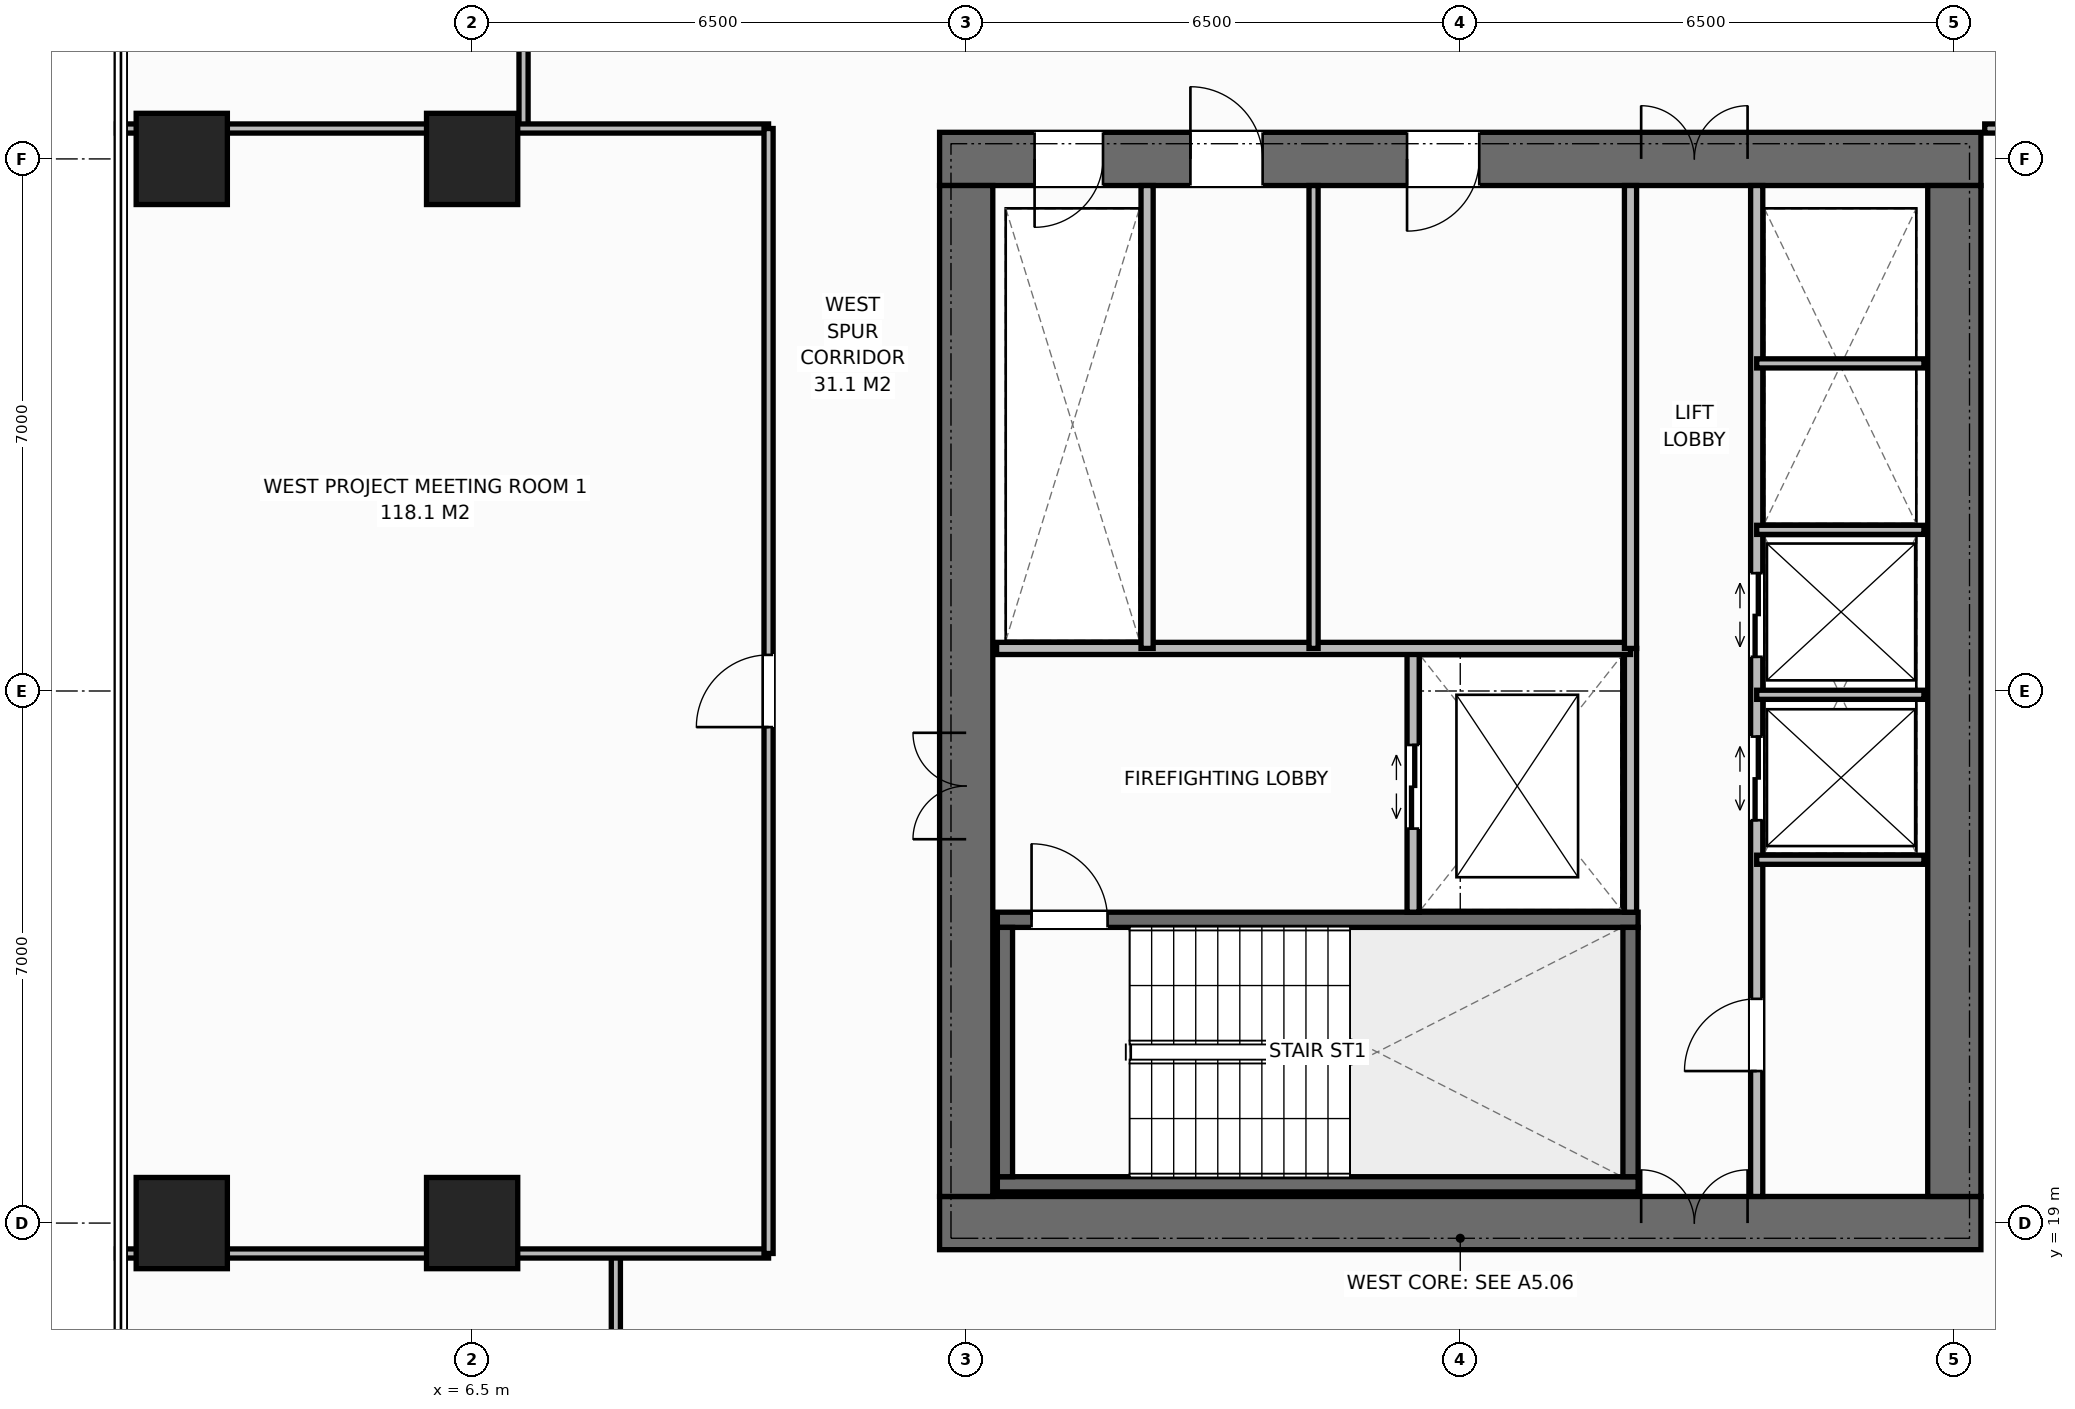
"""IFC4 building model, lengths in metres.
Left out: names, types, materials, properties, quantities, classifications, styles, units other than length and angle.
Written with IfcOpenShell. Run it as: python <this file> out.ifc"""

import sys

from ifc_helpers import new_model, si_unit, direction, frame, frame_2d, origin, origin_2d, place, context, subcontext, project, spatial, rectangle, extrude, element, fill, save


model = new_model("IFC4")
c1 = context("Model", 3, precision=1e-05, world=origin(), true_north=direction((0.0, 1.0)))
c2 = subcontext(c1, "Body", "Model", "MODEL_VIEW")
j1 = project(units=[si_unit("LENGTHUNIT", "METRE"), si_unit("PLANEANGLEUNIT", "RADIAN")], contexts=[c1])
p1 = place(None, origin())
s1 = spatial("IfcSite", under=j1, at=p1, CompositionType="ELEMENT")
p2 = place(p1, origin())
s2 = spatial("IfcBuilding", under=s1, at=p2, CompositionType="ELEMENT")
p3 = place(p2, frame((0.0, 0.0, 127.8)))
s3 = spatial("IfcBuildingStorey", under=s2, at=p3, CompositionType="ELEMENT", Elevation=127.8)
p4 = place(p3, frame((12.65, 19.0, 0.0), z_axis=(0.0, 0.0, 1.0), x_axis=(1.0, 0.0, 0.0)))
e1 = element("IfcWall", 1, at=p4, inside=s3, PredefinedType="SHEAR", context=c2, shape_type="SweptSolid", body=[
    extrude(rectangle(XDim=13.7, YDim=0.7, at=frame_2d((6.85, 0.0))), origin(), (0.0, 0.0, 1.0), 3.8),
])
p5 = place(p4, frame((9.23, 0.0, 0.0)))
e2 = element("IfcOpeningElement", 2, at=p5, cuts=e1, PredefinedType="OPENING", context=c2, shape_type="SweptSolid", body=[
    extrude(rectangle(XDim=1.4, YDim=2.2, at=frame_2d((0.7, 1.1))), frame((0.0, 0.36, 0.0), z_axis=(0.0, -1.0, 0.0), x_axis=(1.0, 0.0, 0.0)), (0.0, 0.0, 1.0), 0.72),
])
p6 = place(p3, frame((12.65, 33.0, 0.0), z_axis=(0.0, 0.0, 1.0), x_axis=(1.0, 0.0, 0.0)))
e3 = element("IfcWall", 3, at=p6, inside=s3, PredefinedType="SHEAR", context=c2, shape_type="SweptSolid", body=[
    extrude(rectangle(XDim=13.7, YDim=0.7, at=frame_2d((6.85, 0.0))), origin(), (0.0, 0.0, 1.0), 3.8),
])
p7 = place(p6, frame((1.25, 0.0, 0.0)))
e4 = element("IfcOpeningElement", 4, at=p7, cuts=e3, PredefinedType="OPENING", context=c2, shape_type="SweptSolid", body=[
    extrude(rectangle(XDim=0.9, YDim=2.15, at=frame_2d((0.45, 1.075))), frame((0.0, 0.36, 0.0), z_axis=(0.0, -1.0, 0.0), x_axis=(1.0, 0.0, 0.0)), (0.0, 0.0, 1.0), 0.72),
])
p8 = place(p6, frame((3.3, 0.0, 0.0)))
e5 = element("IfcOpeningElement", 5, at=p8, cuts=e3, PredefinedType="OPENING", context=c2, shape_type="SweptSolid", body=[
    extrude(rectangle(XDim=0.95, YDim=2.15, at=frame_2d((0.475, 1.075))), frame((0.0, 0.36, 0.0), z_axis=(0.0, -1.0, 0.0), x_axis=(1.0, 0.0, 0.0)), (0.0, 0.0, 1.0), 0.72),
])
p9 = place(p6, frame((6.15, 0.0, 0.0)))
e6 = element("IfcOpeningElement", 6, at=p9, cuts=e3, PredefinedType="OPENING", context=c2, shape_type="SweptSolid", body=[
    extrude(rectangle(XDim=0.95, YDim=2.15, at=frame_2d((0.475, 1.075))), frame((0.0, 0.36, 0.0), z_axis=(0.0, -1.0, 0.0), x_axis=(1.0, 0.0, 0.0)), (0.0, 0.0, 1.0), 0.72),
])
p10 = place(p6, frame((9.23, 0.0, 0.0)))
e7 = element("IfcOpeningElement", 7, at=p10, cuts=e3, PredefinedType="OPENING", context=c2, shape_type="SweptSolid", body=[
    extrude(rectangle(XDim=1.4, YDim=2.2, at=frame_2d((0.7, 1.1))), frame((0.0, 0.36, 0.0), z_axis=(0.0, -1.0, 0.0), x_axis=(1.0, 0.0, 0.0)), (0.0, 0.0, 1.0), 0.72),
])
p11 = place(p3, frame((13.0, 19.35, 0.0), z_axis=(0.0, 0.0, 1.0), x_axis=(0.0, 1.0, 0.0)))
e8 = element("IfcWall", 8, at=p11, inside=s3, PredefinedType="SHEAR", context=c2, shape_type="SweptSolid", body=[
    extrude(rectangle(XDim=13.3, YDim=0.7, at=frame_2d((6.65, 0.0))), origin(), (0.0, 0.0, 1.0), 3.8),
])
p12 = place(p11, frame((4.7, 0.0, 0.0)))
e9 = element("IfcOpeningElement", 9, at=p12, cuts=e8, PredefinedType="OPENING", context=c2, shape_type="SweptSolid", body=[
    extrude(rectangle(XDim=1.4, YDim=2.2, at=frame_2d((0.7, 1.1))), frame((0.0, 0.36, 0.0), z_axis=(0.0, -1.0, 0.0), x_axis=(1.0, 0.0, 0.0)), (0.0, 0.0, 1.0), 0.72),
])
p13 = place(p3, frame((26.0, 19.35, 0.0), z_axis=(0.0, 0.0, 1.0), x_axis=(0.0, 1.0, 0.0)))
e10 = element("IfcWall", 10, at=p13, inside=s3, PredefinedType="SHEAR", context=c2, shape_type="SweptSolid", body=[
    extrude(rectangle(XDim=13.3, YDim=0.7, at=frame_2d((6.65, 0.0))), origin(), (0.0, 0.0, 1.0), 3.8),
])
p14 = place(p3, frame((13.41, 19.51, 0.0), z_axis=(0.0, 0.0, 1.0), x_axis=(1.0, 0.0, 0.0)))
e11 = element("IfcWall", 11, at=p14, inside=s3, PredefinedType="SHEAR", context=c2, shape_type="SweptSolid", body=[
    extrude(rectangle(XDim=8.43, YDim=0.2, at=frame_2d((4.215, 0.0))), origin(), (0.0, 0.0, 1.0), 3.8),
])
p15 = place(p3, frame((13.41, 22.99, 0.0), z_axis=(0.0, 0.0, 1.0), x_axis=(1.0, 0.0, 0.0)))
e12 = element("IfcWall", 12, at=p15, inside=s3, PredefinedType="SHEAR", context=c2, shape_type="SweptSolid", body=[
    extrude(rectangle(XDim=8.43, YDim=0.2, at=frame_2d((4.215, 0.0))), origin(), (0.0, 0.0, 1.0), 3.8),
])
p16 = place(p15, frame((0.45, 0.0, 0.0)))
e13 = element("IfcOpeningElement", 13, at=p16, cuts=e12, PredefinedType="OPENING", context=c2, shape_type="SweptSolid", body=[
    extrude(rectangle(XDim=1.0, YDim=2.15, at=frame_2d((0.5, 1.075))), frame((0.0, 0.11, 0.0), z_axis=(0.0, -1.0, 0.0), x_axis=(1.0, 0.0, 0.0)), (0.0, 0.0, 1.0), 0.22),
])
for number, where, z_axis, x_axis in (
    (14, (13.51, 19.61, 0.0), (0.0, 0.0, 1.0), (0.0, 1.0, 0.0)),
    (15, (21.74, 19.61, 0.0), (0.0, 0.0, 1.0), (0.0, 1.0, 0.0)),
):
    element("IfcWall", number, at=place(p3, frame(where, z_axis=z_axis, x_axis=x_axis)), inside=s3, PredefinedType="SHEAR", context=c2, shape_type="SweptSolid", body=[
        extrude(rectangle(XDim=3.28, YDim=0.2, at=frame_2d((1.64, 0.0))), origin(), (0.0, 0.0, 1.0), 3.8),
    ])
for number, where, z_axis, x_axis in (
    (16, (6.5, 19.0, 0.0), (0.0, 0.0, 1.0), (1.0, 0.0, 0.0)),
    (17, (6.5, 33.0, 0.0), (0.0, 0.0, 1.0), (1.0, 0.0, 0.0)),
    (18, (2.68, 19.0, 0.0), (0.0, 0.0, 1.0), (1.0, 0.0, 0.0)),
    (19, (2.68, 33.0, 0.0), (0.0, 0.0, 1.0), (1.0, 0.0, 0.0)),
):
    element("IfcColumn", number, at=place(p3, frame(where, z_axis=z_axis, x_axis=x_axis)), inside=s3, PredefinedType="COLUMN", context=c2, shape_type="SweptSolid", body=[
        extrude(rectangle(XDim=1.2, YDim=1.2, at=origin_2d()), origin(), (0.0, 0.0, 1.0), 3.8),
    ])
p17 = place(p3, frame((21.74, 23.09, 0.0), z_axis=(0.0, 0.0, 1.0), x_axis=(0.0, 1.0, 0.0)))
e20 = element("IfcWall", 20, at=p17, inside=s3, PredefinedType="STANDARD", context=c2, shape_type="SweptSolid", body=[
    extrude(rectangle(XDim=3.47, YDim=0.16, at=frame_2d((1.735, 0.0))), origin(), (0.0, 0.0, 1.0), 3.565),
])
p18 = place(p3, frame((18.88, 23.09, 0.0), z_axis=(0.0, 0.0, 1.0), x_axis=(0.0, 1.0, 0.0)))
e21 = element("IfcWall", 21, at=p18, inside=s3, PredefinedType="STANDARD", context=c2, shape_type="SweptSolid", body=[
    extrude(rectangle(XDim=3.47, YDim=0.16, at=frame_2d((1.735, 0.0))), origin(), (0.0, 0.0, 1.0), 3.565),
])
p19 = place(p18, frame((1.1, 0.0, 0.0)))
e22 = element("IfcOpeningElement", 22, at=p19, cuts=e21, PredefinedType="OPENING", context=c2, shape_type="SweptSolid", body=[
    extrude(rectangle(XDim=1.1, YDim=2.2, at=frame_2d((0.55, 1.1))), frame((0.0, 0.09, 0.0), z_axis=(0.0, -1.0, 0.0), x_axis=(1.0, 0.0, 0.0)), (0.0, 0.0, 1.0), 0.18),
])
p20 = place(p3, frame((13.4, 26.56, 0.0), z_axis=(0.0, 0.0, 1.0), x_axis=(1.0, 0.0, 0.0)))
e23 = element("IfcWall", 23, at=p20, inside=s3, PredefinedType="STANDARD", context=c2, shape_type="SweptSolid", body=[
    extrude(rectangle(XDim=8.34, YDim=0.16, at=frame_2d((4.17, 0.0))), origin(), (0.0, 0.0, 1.0), 3.565),
])
p21 = place(p3, frame((15.38, 26.56, 0.0), z_axis=(0.0, 0.0, 1.0), x_axis=(0.0, 1.0, 0.0)))
e24 = element("IfcWall", 24, at=p21, inside=s3, PredefinedType="STANDARD", context=c2, shape_type="SweptSolid", body=[
    extrude(rectangle(XDim=6.09, YDim=0.16, at=frame_2d((3.045, 0.0))), origin(), (0.0, 0.0, 1.0), 3.565),
])
p22 = place(p3, frame((17.57, 26.56, 0.0), z_axis=(0.0, 0.0, 1.0), x_axis=(0.0, 1.0, 0.0)))
e25 = element("IfcWall", 25, at=p22, inside=s3, PredefinedType="PARTITIONING", context=c2, shape_type="SweptSolid", body=[
    extrude(rectangle(XDim=6.09, YDim=0.12, at=frame_2d((3.045, 0.0))), origin(), (0.0, 0.0, 1.0), 3.565),
])
p23 = place(p3, frame((21.74, 26.56, 0.0), z_axis=(0.0, 0.0, 1.0), x_axis=(0.0, 1.0, 0.0)))
e26 = element("IfcWall", 26, at=p23, inside=s3, PredefinedType="STANDARD", context=c2, shape_type="SweptSolid", body=[
    extrude(rectangle(XDim=6.09, YDim=0.16, at=frame_2d((3.045, 0.0))), origin(), (0.0, 0.0, 1.0), 3.565),
])
p24 = place(p3, frame((23.4, 19.35, 0.0), z_axis=(0.0, 0.0, 1.0), x_axis=(0.0, 1.0, 0.0)))
e27 = element("IfcWall", 27, at=p24, inside=s3, PredefinedType="STANDARD", context=c2, shape_type="SweptSolid", body=[
    extrude(rectangle(XDim=13.3, YDim=0.16, at=frame_2d((6.65, 0.0))), origin(), (0.0, 0.0, 1.0), 3.565),
])
p25 = place(p24, frame((1.65, 0.0, 0.0)))
e28 = element("IfcOpeningElement", 28, at=p25, cuts=e27, PredefinedType="OPENING", context=c2, shape_type="SweptSolid", body=[
    extrude(rectangle(XDim=0.95, YDim=2.15, at=frame_2d((0.475, 1.075))), frame((0.0, 0.09, 0.0), z_axis=(0.0, -1.0, 0.0), x_axis=(1.0, 0.0, 0.0)), (0.0, 0.0, 1.0), 0.18),
])
p26 = place(p24, frame((4.95, 0.0, 0.0)))
e29 = element("IfcOpeningElement", 29, at=p26, cuts=e27, PredefinedType="OPENING", context=c2, shape_type="SweptSolid", body=[
    extrude(rectangle(XDim=1.1, YDim=2.2, at=frame_2d((0.55, 1.1))), frame((0.0, 0.09, 0.0), z_axis=(0.0, -1.0, 0.0), x_axis=(1.0, 0.0, 0.0)), (0.0, 0.0, 1.0), 0.18),
])
p27 = place(p24, frame((7.1, 0.0, 0.0)))
e30 = element("IfcOpeningElement", 30, at=p27, cuts=e27, PredefinedType="OPENING", context=c2, shape_type="SweptSolid", body=[
    extrude(rectangle(XDim=1.1, YDim=2.2, at=frame_2d((0.55, 1.1))), frame((0.0, 0.09, 0.0), z_axis=(0.0, -1.0, 0.0), x_axis=(1.0, 0.0, 0.0)), (0.0, 0.0, 1.0), 0.18),
])
for number, where, z_axis, x_axis in (
    (31, (23.4, 23.78, 0.0), (0.0, 0.0, 1.0), (1.0, 0.0, 0.0)),
    (32, (23.4, 25.95, 0.0), (0.0, 0.0, 1.0), (1.0, 0.0, 0.0)),
    (33, (23.4, 28.12, 0.0), (0.0, 0.0, 1.0), (1.0, 0.0, 0.0)),
    (34, (23.4, 30.31, 0.0), (0.0, 0.0, 1.0), (1.0, 0.0, 0.0)),
):
    element("IfcWall", number, at=place(p3, frame(where, z_axis=z_axis, x_axis=x_axis)), inside=s3, PredefinedType="PARTITIONING", context=c2, shape_type="SweptSolid", body=[
        extrude(rectangle(XDim=2.2, YDim=0.12, at=frame_2d((1.1, 0.0))), origin(), (0.0, 0.0, 1.0), 3.565),
    ])
p28 = place(p3, frame((26.4, 33.4, 0.0), z_axis=(0.0, 0.0, 1.0), x_axis=(1.0, 0.0, 0.0)))
e35 = element("IfcWall", 35, at=p28, inside=s3, PredefinedType="PARTITIONING", context=c2, shape_type="SweptSolid", body=[
    extrude(rectangle(XDim=3.6, YDim=0.12, at=frame_2d((1.8, 0.0))), origin(), (0.0, 0.0, 1.0), 3.565),
])
p29 = place(p28, frame((1.1, 0.0, 0.0)))
e36 = element("IfcOpeningElement", 36, at=p29, cuts=e35, PredefinedType="OPENING", context=c2, shape_type="SweptSolid", body=[
    extrude(rectangle(XDim=0.95, YDim=2.15, at=frame_2d((0.475, 1.075))), frame((0.0, 0.07, 0.0), z_axis=(0.0, -1.0, 0.0), x_axis=(1.0, 0.0, 0.0)), (0.0, 0.0, 1.0), 0.14),
])
for number, where, z_axis, x_axis in (
    (37, (7.177, 33.4, 0.0), (0.0, 0.0, 1.0), (0.0, 1.0, 0.0)),
    (38, (8.391, 16.5, 0.0), (0.0, 0.0, 1.0), (0.0, 1.0, 0.0)),
):
    element("IfcWall", number, at=place(p3, frame(where, z_axis=z_axis, x_axis=x_axis)), inside=s3, PredefinedType="PARTITIONING", context=c2, shape_type="SweptSolid", body=[
        extrude(rectangle(XDim=2.1, YDim=0.12, at=frame_2d((1.05, 0.0))), origin(), (0.0, 0.0, 1.0), 3.565),
    ])
for number, where, z_axis, x_axis in (
    (39, (1.82, 18.6, 0.0), (0.0, 0.0, 1.0), (1.0, 0.0, 0.0)),
    (40, (1.82, 33.4, 0.0), (0.0, 0.0, 1.0), (1.0, 0.0, 0.0)),
):
    element("IfcWall", number, at=place(p3, frame(where, z_axis=z_axis, x_axis=x_axis)), inside=s3, PredefinedType="PARTITIONING", context=c2, shape_type="SweptSolid", body=[
        extrude(rectangle(XDim=8.58, YDim=0.12, at=frame_2d((4.29, 0.0))), origin(), (0.0, 0.0, 1.0), 3.565),
    ])
p30 = place(p3, frame((10.4, 18.6, 0.0), z_axis=(0.0, 0.0, 1.0), x_axis=(0.0, 1.0, 0.0)))
e41 = element("IfcWall", 41, at=p30, inside=s3, PredefinedType="PARTITIONING", context=c2, shape_type="SweptSolid", body=[
    extrude(rectangle(XDim=14.8, YDim=0.12, at=frame_2d((7.4, 0.0))), origin(), (0.0, 0.0, 1.0), 3.565),
])
p31 = place(p30, frame((6.925, 0.0, 0.0)))
e42 = element("IfcOpeningElement", 42, at=p31, cuts=e41, PredefinedType="OPENING", context=c2, shape_type="SweptSolid", body=[
    extrude(rectangle(XDim=0.95, YDim=2.15, at=frame_2d((0.475, 1.075))), frame((0.0, 0.07, 0.0), z_axis=(0.0, -1.0, 0.0), x_axis=(1.0, 0.0, 0.0)), (0.0, 0.0, 1.0), 0.14),
])
p32 = place(p16, origin())
e43 = element("IfcDoor", 43, at=p32, inside=s3, OperationType="SINGLE_SWING_LEFT", PredefinedType="DOOR", context=c2, shape_type="SweptSolid", body=[
    extrude(rectangle(XDim=1.0, YDim=2.15, at=frame_2d((0.5, 1.075))), frame((0.0, 0.025, 0.0), z_axis=(0.0, -1.0, 0.0), x_axis=(1.0, 0.0, 0.0)), (0.0, 0.0, 1.0), 0.05),
])
fill(e13, e43)
p33 = place(p12, origin())
e44 = element("IfcDoor", 44, at=p33, inside=s3, OperationType="DOUBLE_DOOR_SINGLE_SWING", PredefinedType="DOOR", context=c2, shape_type="SweptSolid", body=[
    extrude(rectangle(XDim=1.4, YDim=2.2, at=frame_2d((0.7, 1.1))), frame((0.0, 0.025, 0.0), z_axis=(0.0, -1.0, 0.0), x_axis=(1.0, 0.0, 0.0)), (0.0, 0.0, 1.0), 0.05),
])
fill(e9, e44)
p34 = place(p19, origin())
e45 = element("IfcDoor", 45, at=p34, inside=s3, OperationType="DOUBLE_DOOR_SLIDING", PredefinedType="DOOR", context=c2, shape_type="SweptSolid", body=[
    extrude(rectangle(XDim=1.1, YDim=2.2, at=frame_2d((0.55, 1.1))), frame((0.0, 0.025, 0.0), z_axis=(0.0, -1.0, 0.0), x_axis=(1.0, 0.0, 0.0)), (0.0, 0.0, 1.0), 0.05),
])
fill(e22, e45)
p35 = place(p7, origin())
e46 = element("IfcDoor", 46, at=p35, inside=s3, OperationType="SINGLE_SWING_RIGHT", PredefinedType="DOOR", context=c2, shape_type="SweptSolid", body=[
    extrude(rectangle(XDim=0.9, YDim=2.15, at=frame_2d((0.45, 1.075))), frame((0.0, -0.075, 0.0), z_axis=(0.0, -1.0, 0.0), x_axis=(1.0, 0.0, 0.0)), (0.0, 0.0, 1.0), 0.05),
])
fill(e4, e46)
p36 = place(p8, origin())
e47 = element("IfcDoor", 47, at=p36, inside=s3, OperationType="SINGLE_SWING_LEFT", PredefinedType="DOOR", context=c2, shape_type="SweptSolid", body=[
    extrude(rectangle(XDim=0.95, YDim=2.15, at=frame_2d((0.475, 1.075))), frame((0.0, -0.075, 0.0), z_axis=(0.0, -1.0, 0.0), x_axis=(1.0, 0.0, 0.0)), (0.0, 0.0, 1.0), 0.05),
])
fill(e5, e47)
p37 = place(p9, origin())
e48 = element("IfcDoor", 48, at=p37, inside=s3, OperationType="SINGLE_SWING_RIGHT", PredefinedType="DOOR", context=c2, shape_type="SweptSolid", body=[
    extrude(rectangle(XDim=0.95, YDim=2.15, at=frame_2d((0.475, 1.075))), frame((0.0, -0.075, 0.0), z_axis=(0.0, -1.0, 0.0), x_axis=(1.0, 0.0, 0.0)), (0.0, 0.0, 1.0), 0.05),
])
fill(e6, e48)
p38 = place(p5, origin())
e49 = element("IfcDoor", 49, at=p38, inside=s3, OperationType="DOUBLE_DOOR_SINGLE_SWING", PredefinedType="DOOR", context=c2, shape_type="SweptSolid", body=[
    extrude(rectangle(XDim=1.4, YDim=2.2, at=frame_2d((0.7, 1.1))), frame((0.0, 0.125, 0.0), z_axis=(0.0, -1.0, 0.0), x_axis=(1.0, 0.0, 0.0)), (0.0, 0.0, 1.0), 0.05),
])
fill(e2, e49)
p39 = place(p10, origin())
e50 = element("IfcDoor", 50, at=p39, inside=s3, OperationType="DOUBLE_DOOR_SINGLE_SWING", PredefinedType="DOOR", context=c2, shape_type="SweptSolid", body=[
    extrude(rectangle(XDim=1.4, YDim=2.2, at=frame_2d((0.7, 1.1))), frame((0.0, -0.075, 0.0), z_axis=(0.0, -1.0, 0.0), x_axis=(1.0, 0.0, 0.0)), (0.0, 0.0, 1.0), 0.05),
])
fill(e7, e50)
p40 = place(p25, origin())
e51 = element("IfcDoor", 51, at=p40, inside=s3, OperationType="SINGLE_SWING_LEFT", PredefinedType="DOOR", context=c2, shape_type="SweptSolid", body=[
    extrude(rectangle(XDim=0.95, YDim=2.15, at=frame_2d((0.475, 1.075))), frame((0.0, 0.025, 0.0), z_axis=(0.0, -1.0, 0.0), x_axis=(1.0, 0.0, 0.0)), (0.0, 0.0, 1.0), 0.05),
])
fill(e28, e51)
p41 = place(p26, origin())
e52 = element("IfcDoor", 52, at=p41, inside=s3, OperationType="DOUBLE_DOOR_SLIDING", PredefinedType="DOOR", context=c2, shape_type="SweptSolid", body=[
    extrude(rectangle(XDim=1.1, YDim=2.2, at=frame_2d((0.55, 1.1))), frame((0.0, 0.025, 0.0), z_axis=(0.0, -1.0, 0.0), x_axis=(1.0, 0.0, 0.0)), (0.0, 0.0, 1.0), 0.05),
])
fill(e29, e52)
p42 = place(p27, origin())
e53 = element("IfcDoor", 53, at=p42, inside=s3, OperationType="DOUBLE_DOOR_SLIDING", PredefinedType="DOOR", context=c2, shape_type="SweptSolid", body=[
    extrude(rectangle(XDim=1.1, YDim=2.2, at=frame_2d((0.55, 1.1))), frame((0.0, 0.025, 0.0), z_axis=(0.0, -1.0, 0.0), x_axis=(1.0, 0.0, 0.0)), (0.0, 0.0, 1.0), 0.05),
])
fill(e30, e53)
p43 = place(p31, origin())
e54 = element("IfcDoor", 54, at=p43, inside=s3, OperationType="SINGLE_SWING_LEFT", PredefinedType="DOOR", context=c2, shape_type="SweptSolid", body=[
    extrude(rectangle(XDim=0.95, YDim=2.15, at=frame_2d((0.475, 1.075))), frame((0.0, 0.025, 0.0), z_axis=(0.0, -1.0, 0.0), x_axis=(1.0, 0.0, 0.0)), (0.0, 0.0, 1.0), 0.05),
])
fill(e42, e54)
save(model, sys.argv[1])
